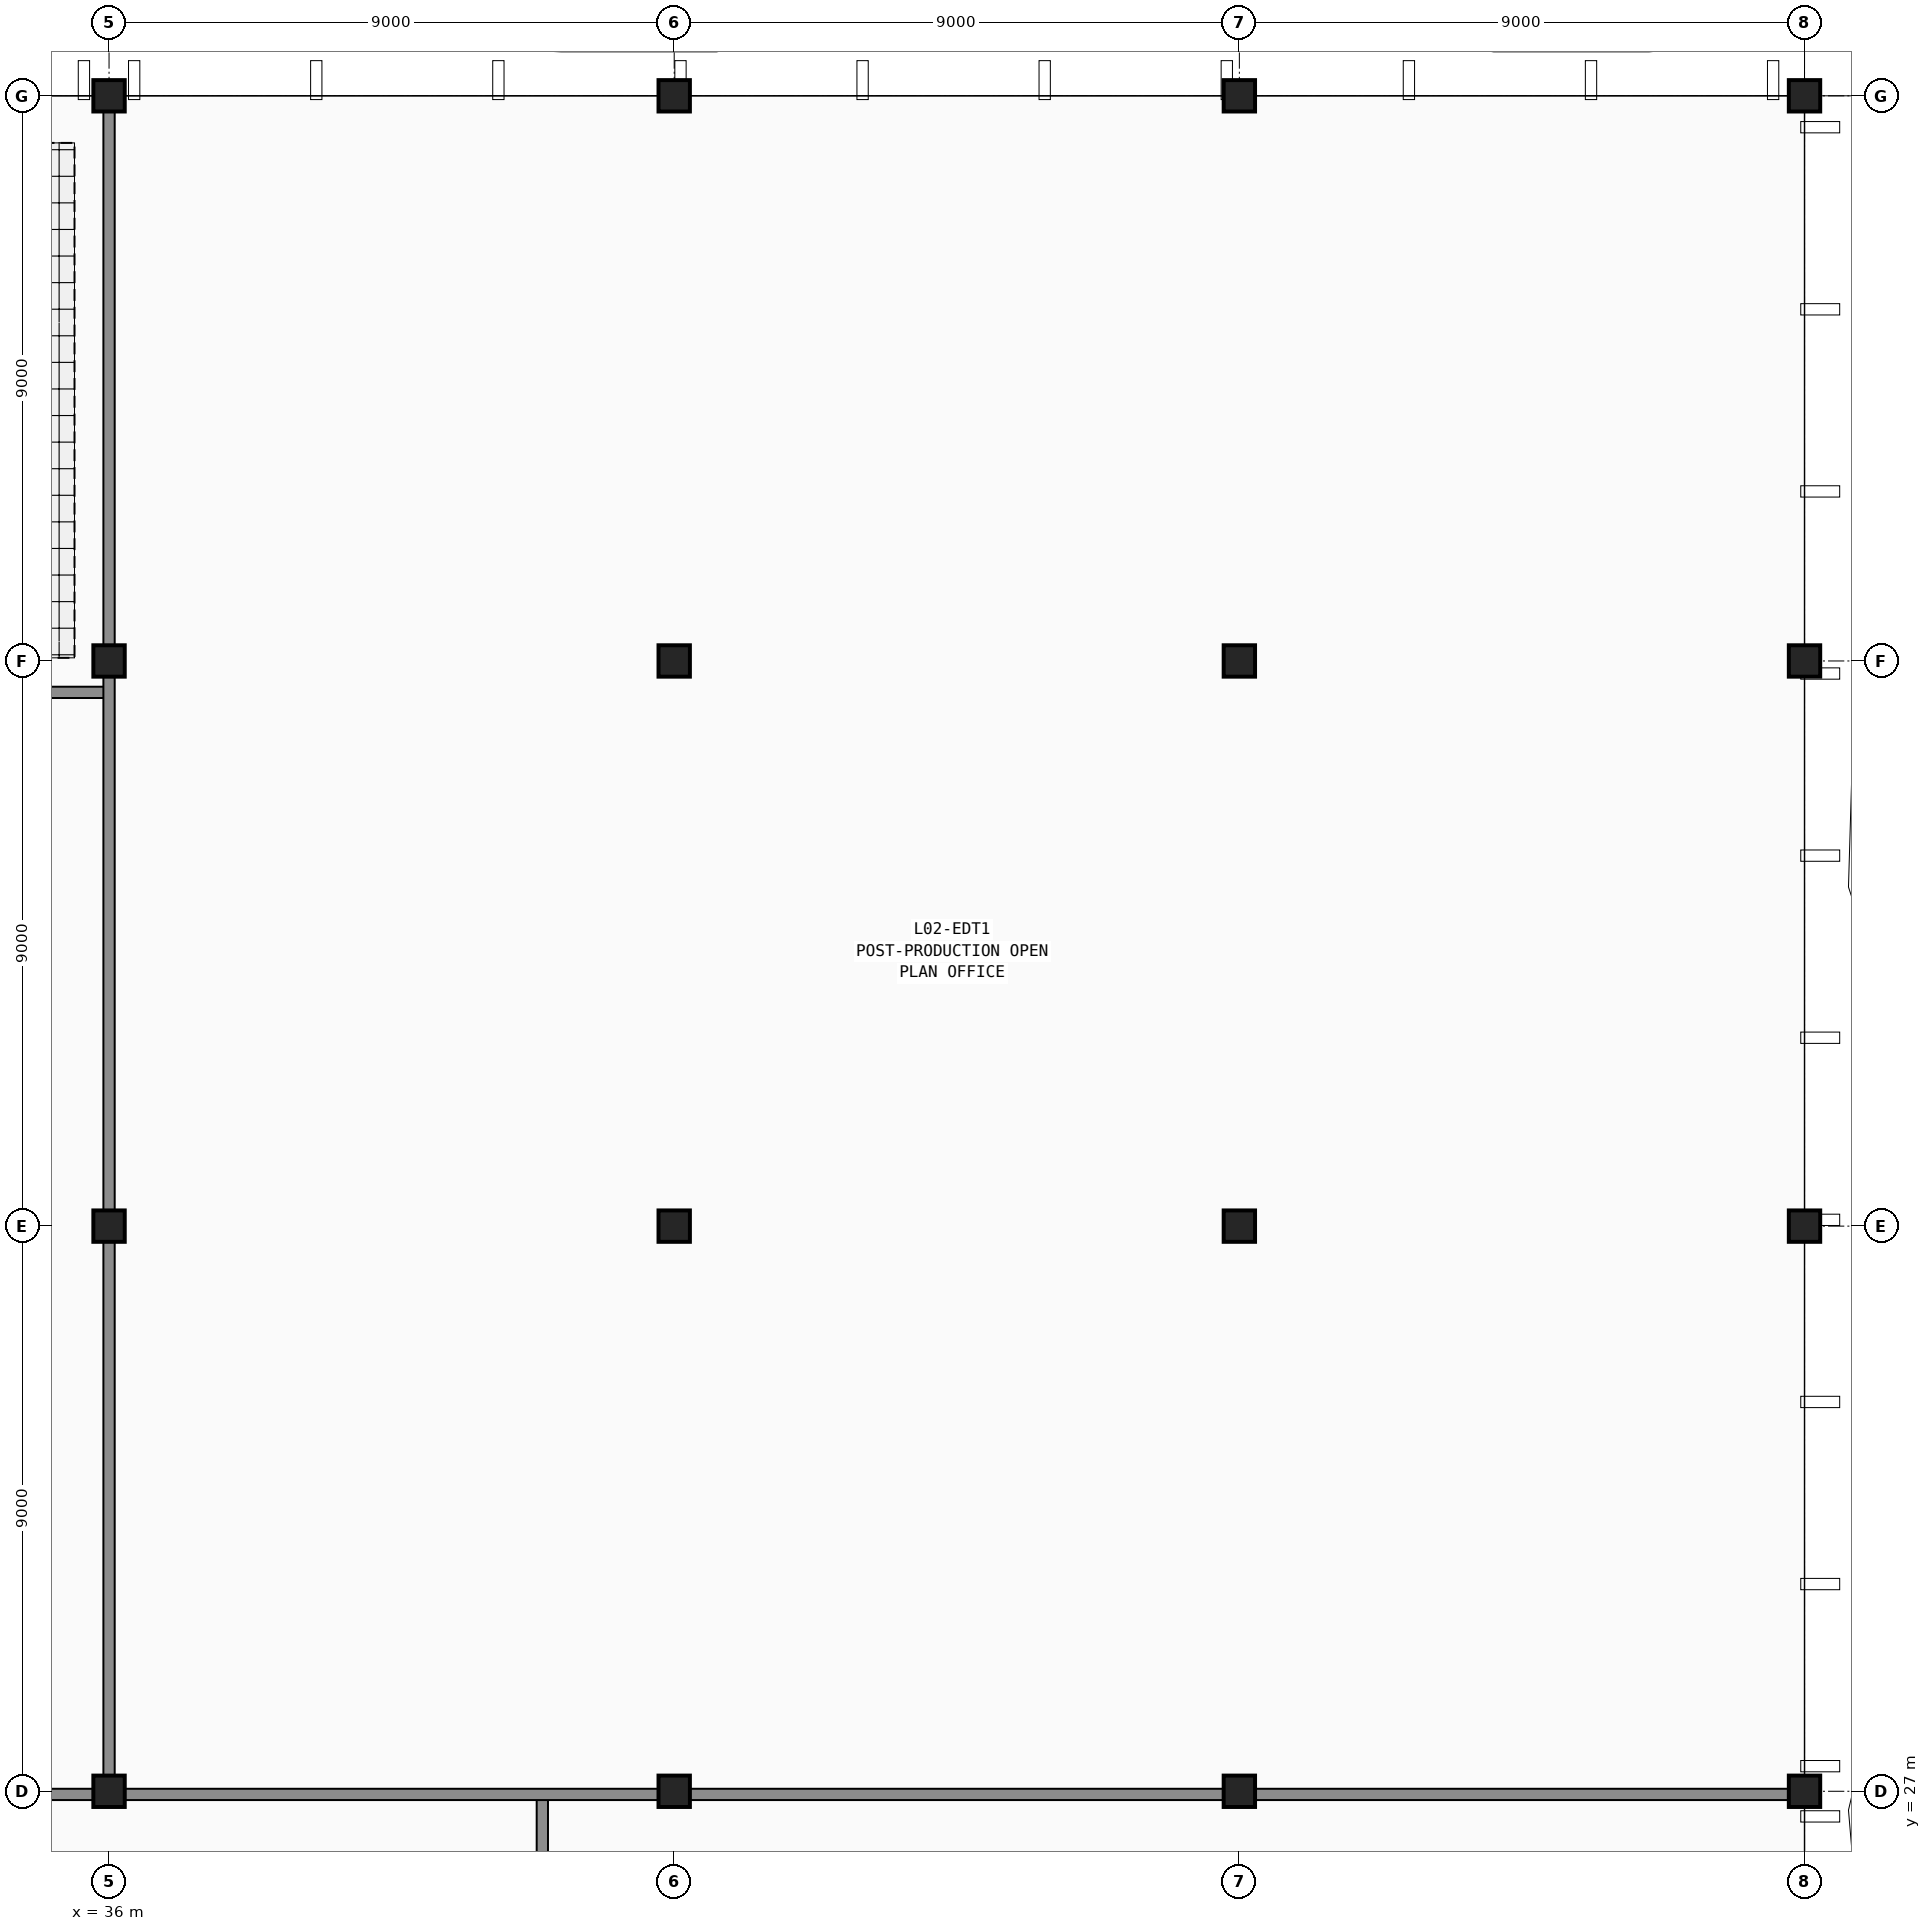
"""IFC4 building model, lengths in metres.
Left out: names, types, materials, properties, quantities, classifications, styles, units other than length and angle.
Written with IfcOpenShell. Run it as: python <this file> out.ifc"""

import sys

from ifc_helpers import new_model, si_unit, direction, frame, frame_2d, origin, origin_2d, place, context, subcontext, project, spatial, rectangle, i_section, extrude, element, fill, save


model = new_model("IFC4")
c1 = context("Model", 3, precision=1e-05, world=origin(), true_north=direction((0.0, 1.0)))
c2 = subcontext(c1, "Body", "Model", "MODEL_VIEW")
j1 = project(units=[si_unit("LENGTHUNIT", "METRE"), si_unit("PLANEANGLEUNIT", "RADIAN")], contexts=[c1])
p1 = place(None, origin())
s1 = spatial("IfcSite", under=j1, at=p1, CompositionType="ELEMENT")
p2 = place(p1, origin())
s2 = spatial("IfcBuilding", under=s1, at=p2, CompositionType="ELEMENT")
p3 = place(p2, frame((0.0, 0.0, 11.0)))
s3 = spatial("IfcBuildingStorey", under=s2, at=p3, CompositionType="ELEMENT", Elevation=11.0)
for number, where, z_axis, x_axis in (
    (1, (36.0, 27.0, 0.0), (0.0, 0.0, 1.0), (1.0, 0.0, 0.0)),
    (2, (36.0, 36.0, 0.0), (0.0, 0.0, 1.0), (1.0, 0.0, 0.0)),
    (3, (36.0, 45.0, 0.0), (0.0, 0.0, 1.0), (1.0, 0.0, 0.0)),
    (4, (36.0, 54.0, 0.0), (0.0, 0.0, 1.0), (1.0, 0.0, 0.0)),
    (5, (45.0, 27.0, 0.0), (0.0, 0.0, 1.0), (1.0, 0.0, 0.0)),
    (6, (45.0, 36.0, 0.0), (0.0, 0.0, 1.0), (1.0, 0.0, 0.0)),
    (7, (45.0, 45.0, 0.0), (0.0, 0.0, 1.0), (1.0, 0.0, 0.0)),
    (8, (45.0, 54.0, 0.0), (0.0, 0.0, 1.0), (1.0, 0.0, 0.0)),
    (9, (54.0, 27.0, 0.0), (0.0, 0.0, 1.0), (1.0, 0.0, 0.0)),
    (10, (54.0, 36.0, 0.0), (0.0, 0.0, 1.0), (1.0, 0.0, 0.0)),
    (11, (54.0, 45.0, 0.0), (0.0, 0.0, 1.0), (1.0, 0.0, 0.0)),
    (12, (54.0, 54.0, 0.0), (0.0, 0.0, 1.0), (1.0, 0.0, 0.0)),
    (13, (63.0, 27.0, 0.0), (0.0, 0.0, 1.0), (1.0, 0.0, 0.0)),
    (14, (63.0, 36.0, 0.0), (0.0, 0.0, 1.0), (1.0, 0.0, 0.0)),
    (15, (63.0, 45.0, 0.0), (0.0, 0.0, 1.0), (1.0, 0.0, 0.0)),
    (16, (63.0, 54.0, 0.0), (0.0, 0.0, 1.0), (1.0, 0.0, 0.0)),
):
    element("IfcColumn", number, at=place(p3, frame(where, z_axis=z_axis, x_axis=x_axis)), inside=s3, PredefinedType="COLUMN", context=c2, shape_type="SweptSolid", body=[
        extrude(i_section(OverallWidth=0.442, OverallDepth=0.531, WebThickness=0.066, FlangeThickness=0.106, FilletRadius=0.015, at=origin_2d()), origin(), (0.0, 0.0, 1.0), 5.2),
    ])
p4 = place(p3, frame((42.9, 24.6, 0.0), z_axis=(0.0, 0.0, 1.0), x_axis=(0.0, 1.0, 0.0)))
e17 = element("IfcWall", 17, at=p4, inside=s3, PredefinedType="PARTITIONING", context=c2, shape_type="SweptSolid", body=[
    extrude(rectangle(XDim=2.35, YDim=0.18, at=frame_2d((1.175, 0.0))), origin(), (0.0, 0.0, 1.0), 3.933),
])
p5 = place(p4, frame((0.65, 0.0, 0.0)))
e18 = element("IfcOpeningElement", 18, at=p5, cuts=e17, PredefinedType="OPENING", context=c2, shape_type="SweptSolid", body=[
    extrude(rectangle(XDim=1.0, YDim=2.1, at=frame_2d((0.5, 1.05))), frame((0.0, 0.1, 0.0), z_axis=(0.0, -1.0, 0.0), x_axis=(1.0, 0.0, 0.0)), (0.0, 0.0, 1.0), 0.2),
])
p6 = place(p3, frame((27.1, 26.95, 0.0), z_axis=(0.0, 0.0, 1.0), x_axis=(1.0, 0.0, 0.0)))
e19 = element("IfcWall", 19, at=p6, inside=s3, PredefinedType="PARTITIONING", context=c2, shape_type="SweptSolid", body=[
    extrude(rectangle(XDim=35.9, YDim=0.18, at=frame_2d((17.95, 0.0))), origin(), (0.0, 0.0, 1.0), 3.933),
])
p7 = place(p3, frame((11.1, 44.5, 0.0), z_axis=(0.0, 0.0, 1.0), x_axis=(1.0, 0.0, 0.0)))
e20 = element("IfcWall", 20, at=p7, inside=s3, PredefinedType="PARTITIONING", context=c2, shape_type="SweptSolid", body=[
    extrude(rectangle(XDim=24.9, YDim=0.18, at=frame_2d((12.45, 0.0))), origin(), (0.0, 0.0, 1.0), 4.005),
])
p8 = place(p7, frame((4.5, 0.0, 0.0)))
e21 = element("IfcOpeningElement", 21, at=p8, cuts=e20, PredefinedType="OPENING", context=c2, shape_type="SweptSolid", body=[
    extrude(rectangle(XDim=1.2, YDim=2.15, at=frame_2d((0.6, 1.075))), frame((0.0, 0.1, 0.0), z_axis=(0.0, -1.0, 0.0), x_axis=(1.0, 0.0, 0.0)), (0.0, 0.0, 1.0), 0.2),
])
p9 = place(p3, frame((36.0, 26.95, 0.0), z_axis=(0.0, 0.0, 1.0), x_axis=(0.0, 1.0, 0.0)))
e22 = element("IfcWall", 22, at=p9, inside=s3, PredefinedType="PARTITIONING", context=c2, shape_type="SweptSolid", body=[
    extrude(rectangle(XDim=27.05, YDim=0.18, at=frame_2d((13.525, 0.0))), origin(), (0.0, 0.0, 1.0), 3.933),
])
p10 = place(p9, frame((4.5, 0.0, 0.0)))
e23 = element("IfcOpeningElement", 23, at=p10, cuts=e22, PredefinedType="OPENING", context=c2, shape_type="SweptSolid", body=[
    extrude(rectangle(XDim=0.86, YDim=2.05, at=frame_2d((0.43, 1.025))), frame((0.0, 0.1, 0.0), z_axis=(0.0, -1.0, 0.0), x_axis=(1.0, 0.0, 0.0)), (0.0, 0.0, 1.0), 0.2),
])
p11 = place(p5, origin())
e24 = element("IfcDoor", 24, at=p11, inside=s3, OperationType="SINGLE_SWING_RIGHT", PredefinedType="DOOR", context=c2, shape_type="SweptSolid", body=[
    extrude(rectangle(XDim=1.0, YDim=2.1, at=frame_2d((0.5, 1.05))), frame((0.0, 0.025, 0.0), z_axis=(0.0, -1.0, 0.0), x_axis=(1.0, 0.0, 0.0)), (0.0, 0.0, 1.0), 0.05),
])
fill(e18, e24)
p12 = place(p10, origin())
e25 = element("IfcDoor", 25, at=p12, inside=s3, OperationType="SINGLE_SWING_LEFT", PredefinedType="DOOR", context=c2, shape_type="SweptSolid", body=[
    extrude(rectangle(XDim=0.86, YDim=2.05, at=frame_2d((0.43, 1.025))), frame((0.0, 0.025, 0.0), z_axis=(0.0, -1.0, 0.0), x_axis=(1.0, 0.0, 0.0)), (0.0, 0.0, 1.0), 0.05),
])
fill(e23, e25)
save(model, sys.argv[1])
